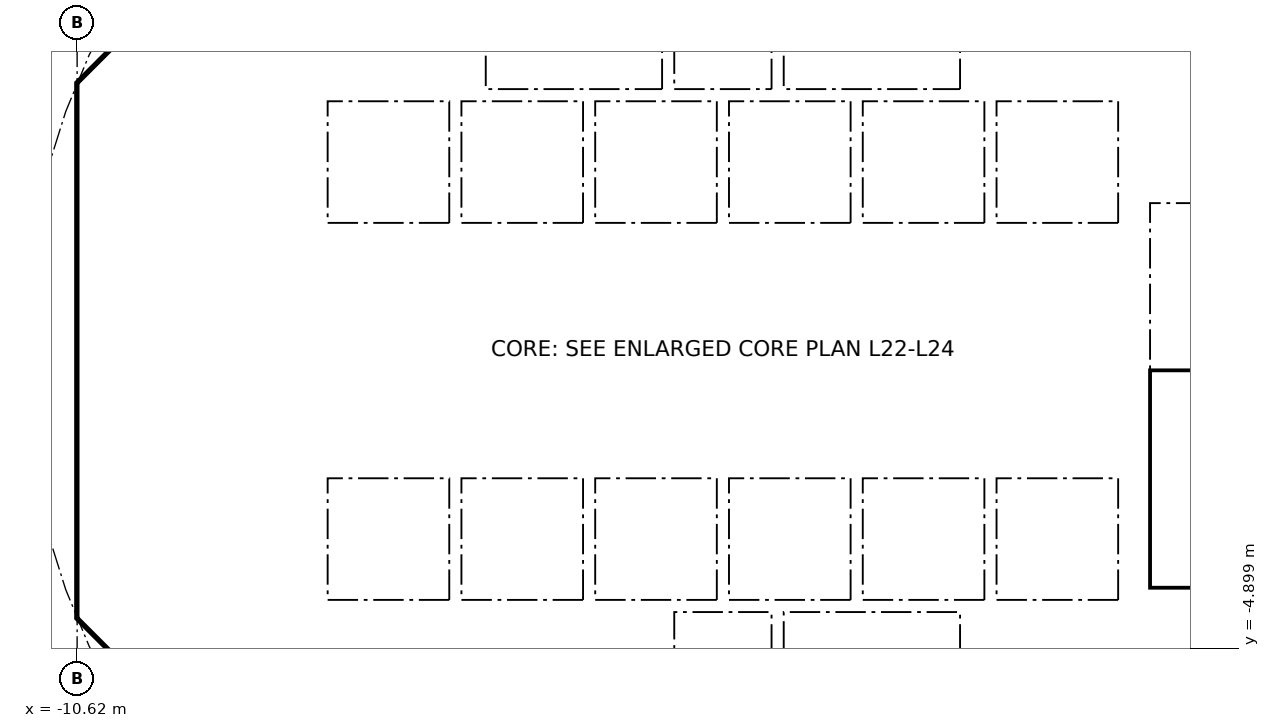
"""IFC4 building model, lengths in metres.
Left out: names, types, materials, properties, quantities, classifications, styles, units other than length and angle.
Written with IfcOpenShell. Run it as: python <this file> out.ifc"""

import sys

from ifc_helpers import new_model, si_unit, direction, frame, frame_2d, origin, place, context, subcontext, project, spatial, polyline, rectangle, outline, extrude, element, fill, save


model = new_model("IFC4")
c1 = context("Model", 3, precision=1e-05, world=origin(), true_north=direction((0.0, 1.0)))
c2 = subcontext(c1, "Body", "Model", "MODEL_VIEW")
j1 = project(units=[si_unit("LENGTHUNIT", "METRE"), si_unit("PLANEANGLEUNIT", "RADIAN")], contexts=[c1])
p1 = place(None, origin())
s1 = spatial("IfcSite", under=j1, at=p1, CompositionType="ELEMENT")
p2 = place(p1, origin())
s2 = spatial("IfcBuilding", under=s1, at=p2, CompositionType="ELEMENT")
p3 = place(p2, frame((0.0, 0.0, 99.2)))
s3 = spatial("IfcBuildingStorey", under=s2, at=p3, CompositionType="ELEMENT", Elevation=99.2)
p4 = place(p3, frame((9.988, 4.613, 0.0), z_axis=(0.0, 0.0, 1.0), x_axis=(-0.707106781187, 0.707106781187, 0.0)))
e1 = element("IfcWall", 1, at=p4, inside=s3, PredefinedType="SHEAR", context=c2, shape_type="SweptSolid", body=[
    extrude(rectangle(XDim=7.602, YDim=0.6, at=frame_2d((3.801, 0.0))), origin(), (0.0, 0.0, 1.0), 3.44),
])
p5 = place(p4, frame((3.201, 0.0, 0.0)))
e2 = element("IfcOpeningElement", 2, at=p5, cuts=e1, PredefinedType="OPENING", context=c2, shape_type="SweptSolid", body=[
    extrude(rectangle(XDim=1.2, YDim=2.1, at=frame_2d((0.6, 1.05))), frame((0.0, 0.31, 0.0), z_axis=(0.0, -1.0, 0.0), x_axis=(1.0, 0.0, 0.0)), (0.0, 0.0, 1.0), 0.62),
])
p6 = place(p3, frame((-4.613, 9.988, 0.0), z_axis=(0.0, 0.0, 1.0), x_axis=(-0.707106781187, -0.707106781187, 0.0)))
e3 = element("IfcWall", 3, at=p6, inside=s3, PredefinedType="SHEAR", context=c2, shape_type="SweptSolid", body=[
    extrude(rectangle(XDim=7.602, YDim=0.6, at=frame_2d((3.801, 0.0))), origin(), (0.0, 0.0, 1.0), 3.44),
])
p7 = place(p6, frame((0.351, 0.0, 0.0)))
e4 = element("IfcOpeningElement", 4, at=p7, cuts=e3, PredefinedType="OPENING", context=c2, shape_type="SweptSolid", body=[
    extrude(rectangle(XDim=1.1, YDim=2.1, at=frame_2d((0.55, 1.05))), frame((0.0, 0.31, 0.0), z_axis=(0.0, -1.0, 0.0), x_axis=(1.0, 0.0, 0.0)), (0.0, 0.0, 1.0), 0.62),
])
p8 = place(p3, frame((-10.325, 3.801, 0.0), z_axis=(0.0, 0.0, 1.0), x_axis=(0.0, -1.0, 0.0)))
e5 = element("IfcWall", 5, at=p8, inside=s3, PredefinedType="SHEAR", context=c2, shape_type="SweptSolid", body=[
    extrude(rectangle(XDim=7.602, YDim=0.6, at=frame_2d((3.801, 0.0))), origin(), (0.0, 0.0, 1.0), 3.44),
])
p9 = place(p8, frame((0.651, 0.0, 0.0)))
e6 = element("IfcOpeningElement", 6, at=p9, cuts=e5, PredefinedType="OPENING", context=c2, shape_type="SweptSolid", body=[
    extrude(rectangle(XDim=1.5, YDim=2.1, at=frame_2d((0.75, 1.05))), frame((0.0, 0.31, 0.0), z_axis=(0.0, -1.0, 0.0), x_axis=(1.0, 0.0, 0.0)), (0.0, 0.0, 1.0), 0.62),
])
p10 = place(p8, frame((5.451, 0.0, 0.0)))
e7 = element("IfcOpeningElement", 7, at=p10, cuts=e5, PredefinedType="OPENING", context=c2, shape_type="SweptSolid", body=[
    extrude(rectangle(XDim=1.5, YDim=2.1, at=frame_2d((0.75, 1.05))), frame((0.0, 0.31, 0.0), z_axis=(0.0, -1.0, 0.0), x_axis=(1.0, 0.0, 0.0)), (0.0, 0.0, 1.0), 0.62),
])
p11 = place(p3, frame((-9.988, -4.613, 0.0), z_axis=(0.0, 0.0, 1.0), x_axis=(0.707106781187, -0.707106781187, 0.0)))
e8 = element("IfcWall", 8, at=p11, inside=s3, PredefinedType="SHEAR", context=c2, shape_type="SweptSolid", body=[
    extrude(rectangle(XDim=7.602, YDim=0.6, at=frame_2d((3.801, 0.0))), origin(), (0.0, 0.0, 1.0), 3.44),
])
p12 = place(p11, frame((6.151, 0.0, 0.0)))
e9 = element("IfcOpeningElement", 9, at=p12, cuts=e8, PredefinedType="OPENING", context=c2, shape_type="SweptSolid", body=[
    extrude(rectangle(XDim=1.1, YDim=2.1, at=frame_2d((0.55, 1.05))), frame((0.0, 0.31, 0.0), z_axis=(0.0, -1.0, 0.0), x_axis=(1.0, 0.0, 0.0)), (0.0, 0.0, 1.0), 0.62),
])
p13 = place(p3, frame((4.613, -9.988, 0.0), z_axis=(0.0, 0.0, 1.0), x_axis=(0.707106781187, 0.707106781187, 0.0)))
e10 = element("IfcWall", 10, at=p13, inside=s3, PredefinedType="SHEAR", context=c2, shape_type="SweptSolid", body=[
    extrude(rectangle(XDim=7.602, YDim=0.6, at=frame_2d((3.801, 0.0))), origin(), (0.0, 0.0, 1.0), 3.44),
])
p14 = place(p13, frame((3.201, 0.0, 0.0)))
e11 = element("IfcOpeningElement", 11, at=p14, cuts=e10, PredefinedType="OPENING", context=c2, shape_type="SweptSolid", body=[
    extrude(rectangle(XDim=1.2, YDim=2.1, at=frame_2d((0.6, 1.05))), frame((0.0, 0.31, 0.0), z_axis=(0.0, -1.0, 0.0), x_axis=(1.0, 0.0, 0.0)), (0.0, 0.0, 1.0), 0.62),
])
p15 = place(p3, frame((-7.0, 4.1, 0.0), z_axis=(0.0, 0.0, 1.0), x_axis=(0.0, 1.0, 0.0)))
e12 = element("IfcWall", 12, at=p15, inside=s3, PredefinedType="PARTITIONING", context=c2, shape_type="SweptSolid", body=[
    extrude(rectangle(XDim=2.927, YDim=0.15, at=frame_2d((1.463, 0.0))), origin(), (0.0, 0.0, 1.0), 3.44),
])
p16 = place(p15, frame((1.051, 0.0, 0.0)))
e13 = element("IfcOpeningElement", 13, at=p16, cuts=e12, PredefinedType="OPENING", context=c2, shape_type="SweptSolid", body=[
    extrude(rectangle(XDim=0.9, YDim=2.1, at=frame_2d((0.45, 1.05))), frame((0.0, 0.085, 0.0), z_axis=(0.0, -1.0, 0.0), x_axis=(1.0, 0.0, 0.0)), (0.0, 0.0, 1.0), 0.17),
])
p17 = place(p3, frame((4.0, 4.3, 0.0), z_axis=(0.0, 0.0, 1.0), x_axis=(0.0, 1.0, 0.0)))
e14 = element("IfcWall", 14, at=p17, inside=s3, PredefinedType="SOLIDWALL", context=c2, shape_type="SweptSolid", body=[
    extrude(rectangle(XDim=2.2, YDim=0.2, at=frame_2d((1.1, 0.0))), origin(), (0.0, 0.0, 1.0), 3.44),
])
p18 = place(p17, frame((0.55, 0.0, 0.0)))
e15 = element("IfcOpeningElement", 15, at=p18, cuts=e14, PredefinedType="OPENING", context=c2, shape_type="SweptSolid", body=[
    extrude(rectangle(XDim=1.1, YDim=2.1, at=frame_2d((0.55, 1.05))), frame((0.0, 0.11, 0.0), z_axis=(0.0, -1.0, 0.0), x_axis=(1.0, 0.0, 0.0)), (0.0, 0.0, 1.0), 0.22),
])
p19 = place(p3, frame((-4.0, 4.3, 0.0), z_axis=(0.0, 0.0, 1.0), x_axis=(0.0, 1.0, 0.0)))
e16 = element("IfcWall", 16, at=p19, inside=s3, PredefinedType="SOLIDWALL", context=c2, shape_type="SweptSolid", body=[
    extrude(rectangle(XDim=2.2, YDim=0.2, at=frame_2d((1.1, 0.0))), origin(), (0.0, 0.0, 1.0), 3.44),
])
p20 = place(p19, frame((0.55, 0.0, 0.0)))
e17 = element("IfcOpeningElement", 17, at=p20, cuts=e16, PredefinedType="OPENING", context=c2, shape_type="SweptSolid", body=[
    extrude(rectangle(XDim=1.1, YDim=2.1, at=frame_2d((0.55, 1.05))), frame((0.0, 0.11, 0.0), z_axis=(0.0, -1.0, 0.0), x_axis=(1.0, 0.0, 0.0)), (0.0, 0.0, 1.0), 0.22),
])
p21 = place(p3, frame((-6.7, 2.0, 0.0), z_axis=(0.0, 0.0, 1.0), x_axis=(1.0, 0.0, 0.0)))
e18 = element("IfcWall", 18, at=p21, inside=s3, PredefinedType="SOLIDWALL", context=c2, shape_type="SweptSolid", body=[
    extrude(rectangle(XDim=13.4, YDim=0.2, at=frame_2d((6.7, 0.0))), origin(), (0.0, 0.0, 1.0), 3.44),
])
p22 = place(p21, frame((0.65, 0.0, 0.0)))
e19 = element("IfcOpeningElement", 19, at=p22, cuts=e18, PredefinedType="OPENING", context=c2, shape_type="SweptSolid", body=[
    extrude(rectangle(XDim=1.1, YDim=2.1, at=frame_2d((0.55, 1.05))), frame((0.0, 0.11, 0.0), z_axis=(0.0, -1.0, 0.0), x_axis=(1.0, 0.0, 0.0)), (0.0, 0.0, 1.0), 0.22),
])
p23 = place(p21, frame((2.85, 0.0, 0.0)))
e20 = element("IfcOpeningElement", 20, at=p23, cuts=e18, PredefinedType="OPENING", context=c2, shape_type="SweptSolid", body=[
    extrude(rectangle(XDim=1.1, YDim=2.1, at=frame_2d((0.55, 1.05))), frame((0.0, 0.11, 0.0), z_axis=(0.0, -1.0, 0.0), x_axis=(1.0, 0.0, 0.0)), (0.0, 0.0, 1.0), 0.22),
])
p24 = place(p21, frame((5.05, 0.0, 0.0)))
e21 = element("IfcOpeningElement", 21, at=p24, cuts=e18, PredefinedType="OPENING", context=c2, shape_type="SweptSolid", body=[
    extrude(rectangle(XDim=1.1, YDim=2.1, at=frame_2d((0.55, 1.05))), frame((0.0, 0.11, 0.0), z_axis=(0.0, -1.0, 0.0), x_axis=(1.0, 0.0, 0.0)), (0.0, 0.0, 1.0), 0.22),
])
p25 = place(p3, frame((6.7, 4.0, 0.0), z_axis=(0.0, 0.0, 1.0), x_axis=(1.0, 0.0, 0.0)))
e22 = element("IfcWall", 22, at=p25, inside=s3, PredefinedType="SOLIDWALL", context=c2, shape_type="SweptSolid", body=[
    extrude(rectangle(XDim=3.325, YDim=0.2, at=frame_2d((1.662, 0.0))), origin(), (0.0, 0.0, 1.0), 3.44),
])
p26 = place(p25, frame((1.25, 0.0, 0.0)))
e23 = element("IfcOpeningElement", 23, at=p26, cuts=e22, PredefinedType="OPENING", context=c2, shape_type="SweptSolid", body=[
    extrude(rectangle(XDim=1.1, YDim=2.1, at=frame_2d((0.55, 1.05))), frame((0.0, 0.11, 0.0), z_axis=(0.0, -1.0, 0.0), x_axis=(1.0, 0.0, 0.0)), (0.0, 0.0, 1.0), 0.22),
])
p27 = place(p3, frame((-7.4, -6.627, 0.0), z_axis=(0.0, 0.0, 1.0), x_axis=(0.0, 1.0, 0.0)))
e24 = element("IfcWall", 24, at=p27, inside=s3, PredefinedType="PARTITIONING", context=c2, shape_type="SweptSolid", body=[
    extrude(rectangle(XDim=2.527, YDim=0.15, at=frame_2d((1.263, 0.0))), origin(), (0.0, 0.0, 1.0), 3.44),
])
p28 = place(p27, frame((0.776, 0.0, 0.0)))
e25 = element("IfcOpeningElement", 25, at=p28, cuts=e24, PredefinedType="OPENING", context=c2, shape_type="SweptSolid", body=[
    extrude(rectangle(XDim=0.9, YDim=2.1, at=frame_2d((0.45, 1.05))), frame((0.0, 0.085, 0.0), z_axis=(0.0, -1.0, 0.0), x_axis=(1.0, 0.0, 0.0)), (0.0, 0.0, 1.0), 0.17),
])
p29 = place(p3, frame((4.0, -6.5, 0.0), z_axis=(0.0, 0.0, 1.0), x_axis=(0.0, 1.0, 0.0)))
e26 = element("IfcWall", 26, at=p29, inside=s3, PredefinedType="SOLIDWALL", context=c2, shape_type="SweptSolid", body=[
    extrude(rectangle(XDim=2.2, YDim=0.2, at=frame_2d((1.1, 0.0))), origin(), (0.0, 0.0, 1.0), 3.44),
])
p30 = place(p29, frame((0.55, 0.0, 0.0)))
e27 = element("IfcOpeningElement", 27, at=p30, cuts=e26, PredefinedType="OPENING", context=c2, shape_type="SweptSolid", body=[
    extrude(rectangle(XDim=1.1, YDim=2.1, at=frame_2d((0.55, 1.05))), frame((0.0, 0.11, 0.0), z_axis=(0.0, -1.0, 0.0), x_axis=(1.0, 0.0, 0.0)), (0.0, 0.0, 1.0), 0.22),
])
p31 = place(p3, frame((-4.0, -6.5, 0.0), z_axis=(0.0, 0.0, 1.0), x_axis=(0.0, 1.0, 0.0)))
e28 = element("IfcWall", 28, at=p31, inside=s3, PredefinedType="SOLIDWALL", context=c2, shape_type="SweptSolid", body=[
    extrude(rectangle(XDim=2.2, YDim=0.2, at=frame_2d((1.1, 0.0))), origin(), (0.0, 0.0, 1.0), 3.44),
])
p32 = place(p31, frame((0.65, 0.0, 0.0)))
e29 = element("IfcOpeningElement", 29, at=p32, cuts=e28, PredefinedType="OPENING", context=c2, shape_type="SweptSolid", body=[
    extrude(rectangle(XDim=0.9, YDim=2.1, at=frame_2d((0.45, 1.05))), frame((0.0, 0.11, 0.0), z_axis=(0.0, -1.0, 0.0), x_axis=(1.0, 0.0, 0.0)), (0.0, 0.0, 1.0), 0.22),
])
p33 = place(p3, frame((-6.7, -2.0, 0.0), z_axis=(0.0, 0.0, 1.0), x_axis=(1.0, 0.0, 0.0)))
e30 = element("IfcWall", 30, at=p33, inside=s3, PredefinedType="SOLIDWALL", context=c2, shape_type="SweptSolid", body=[
    extrude(rectangle(XDim=13.4, YDim=0.2, at=frame_2d((6.7, 0.0))), origin(), (0.0, 0.0, 1.0), 3.44),
])
p34 = place(p33, frame((0.65, 0.0, 0.0)))
e31 = element("IfcOpeningElement", 31, at=p34, cuts=e30, PredefinedType="OPENING", context=c2, shape_type="SweptSolid", body=[
    extrude(rectangle(XDim=1.1, YDim=2.1, at=frame_2d((0.55, 1.05))), frame((0.0, 0.11, 0.0), z_axis=(0.0, -1.0, 0.0), x_axis=(1.0, 0.0, 0.0)), (0.0, 0.0, 1.0), 0.22),
])
p35 = place(p33, frame((2.85, 0.0, 0.0)))
e32 = element("IfcOpeningElement", 32, at=p35, cuts=e30, PredefinedType="OPENING", context=c2, shape_type="SweptSolid", body=[
    extrude(rectangle(XDim=1.1, YDim=2.1, at=frame_2d((0.55, 1.05))), frame((0.0, 0.11, 0.0), z_axis=(0.0, -1.0, 0.0), x_axis=(1.0, 0.0, 0.0)), (0.0, 0.0, 1.0), 0.22),
])
p36 = place(p3, origin())
e33 = element("IfcWall", 33, at=p36, inside=s3, PredefinedType="SHEAR", context=c2, shape_type="SweptSolid", body=[
    extrude(outline(polyline([(-10.625, -3.801), (-10.025, -3.801), (-10.025, -4.152), (-9.776, -4.401), (-10.2, -4.825), (-10.625, -4.401), (-10.625, -3.801)])), origin(), (0.0, 0.0, 1.0), 3.44),
])
p37 = place(p3, origin())
e34 = element("IfcWall", 34, at=p37, inside=s3, PredefinedType="SHEAR", context=c2, shape_type="SweptSolid", body=[
    extrude(outline(polyline([(-10.2, 4.825), (-9.776, 4.401), (-10.025, 4.152), (-10.025, 3.801), (-10.625, 3.801), (-10.625, 4.401), (-10.2, 4.825)])), origin(), (0.0, 0.0, 1.0), 3.44),
])
for number, where, z_axis, x_axis in (
    (35, (-0.9, -6.5, 0.0), (0.0, 0.0, 1.0), (0.0, 1.0, 0.0)),
    (36, (0.9, -6.5, 0.0), (0.0, 0.0, 1.0), (0.0, 1.0, 0.0)),
):
    element("IfcWall", number, at=place(p3, frame(where, z_axis=z_axis, x_axis=x_axis)), inside=s3, PredefinedType="SOLIDWALL", context=c2, shape_type="SweptSolid", body=[
        extrude(rectangle(XDim=2.2, YDim=0.2, at=frame_2d((1.1, 0.0))), origin(), (0.0, 0.0, 1.0), 3.44),
    ])
p38 = place(p3, origin())
e37 = element("IfcWall", 37, at=p38, inside=s3, PredefinedType="SOLIDWALL", context=c2, shape_type="SweptSolid", body=[
    extrude(outline(polyline([(-6.7, -2.1), (-6.5, -2.1), (-6.5, -4.1), (-4.5, -4.1), (-4.5, -2.1), (-4.3, -2.1), (-4.3, -4.1), (-2.3, -4.1), (-2.3, -2.1), (-2.1, -2.1), (-2.1, -4.1), (-0.1, -4.1), (-0.1, -2.1), (0.1, -2.1), (0.1, -4.1), (2.1, -4.1), (2.1, -2.1), (2.3, -2.1), (2.3, -4.1), (4.3, -4.1), (4.3, -2.1), (4.5, -2.1), (4.5, -4.1), (6.5, -4.1), (6.5, -2.1), (6.7, -2.1), (6.7, -4.3), (-6.7, -4.3), (-6.7, -2.1)])), origin(), (0.0, 0.0, 1.0), 3.44),
])
for number, where, z_axis, x_axis in (
    (38, (-0.9, 4.3, 0.0), (0.0, 0.0, 1.0), (0.0, 1.0, 0.0)),
    (39, (0.9, 4.3, 0.0), (0.0, 0.0, 1.0), (0.0, 1.0, 0.0)),
):
    element("IfcWall", number, at=place(p3, frame(where, z_axis=z_axis, x_axis=x_axis)), inside=s3, PredefinedType="SOLIDWALL", context=c2, shape_type="SweptSolid", body=[
        extrude(rectangle(XDim=2.2, YDim=0.2, at=frame_2d((1.1, 0.0))), origin(), (0.0, 0.0, 1.0), 3.44),
    ])
p39 = place(p3, origin())
e40 = element("IfcWall", 40, at=p39, inside=s3, PredefinedType="SOLIDWALL", context=c2, shape_type="SweptSolid", body=[
    extrude(outline(polyline([(-6.5, 2.1), (-6.7, 2.1), (-6.7, 4.3), (6.7, 4.3), (6.7, 2.1), (6.5, 2.1), (6.5, 4.1), (4.5, 4.1), (4.5, 2.1), (4.3, 2.1), (4.3, 4.1), (2.3, 4.1), (2.3, 2.1), (2.1, 2.1), (2.1, 4.1), (0.1, 4.1), (0.1, 2.1), (-0.1, 2.1), (-0.1, 4.1), (-2.1, 4.1), (-2.1, 2.1), (-2.3, 2.1), (-2.3, 4.1), (-4.3, 4.1), (-4.3, 2.1), (-4.5, 2.1), (-4.5, 4.1), (-6.5, 4.1), (-6.5, 2.1)])), origin(), (0.0, 0.0, 1.0), 3.44),
])
for number, where, z_axis, x_axis in (
    (41, (-10.025, -4.0, 0.0), (0.0, 0.0, 1.0), (1.0, 0.0, 0.0)),
    (42, (-10.025, 4.0, 0.0), (0.0, 0.0, 1.0), (1.0, 0.0, 0.0)),
):
    element("IfcWall", number, at=place(p3, frame(where, z_axis=z_axis, x_axis=x_axis)), inside=s3, PredefinedType="PARTITIONING", context=c2, shape_type="SweptSolid", body=[
        extrude(rectangle(XDim=3.325, YDim=0.2, at=frame_2d((1.662, 0.0))), origin(), (0.0, 0.0, 1.0), 3.44),
    ])
p40 = place(p3, origin())
e43 = element("IfcWall", 43, at=p40, inside=s3, PredefinedType="SOLIDWALL", context=c2, shape_type="SweptSolid", body=[
    extrude(outline(polyline([(7.025, -3.9), (6.7, -3.9), (6.7, 3.9), (7.025, 3.9), (7.025, -3.9)])), origin(), (0.0, 0.0, 1.0), 3.44),
])
p41 = place(p3, origin())
e44 = element("IfcWall", 44, at=p41, inside=s3, PredefinedType="SOLIDWALL", context=c2, shape_type="SweptSolid", body=[
    extrude(outline(polyline([(10.025, -4.1), (6.7, -4.1), (6.7, -3.9), (10.025, -3.9), (10.025, -4.1)])), origin(), (0.0, 0.0, 1.0), 3.44),
])
p42 = place(p22, origin())
e45 = element("IfcDoor", 45, at=p42, inside=s3, OperationType="DOUBLE_DOOR_SLIDING", PredefinedType="DOOR", context=c2, shape_type="SweptSolid", body=[
    extrude(rectangle(XDim=1.1, YDim=2.1, at=frame_2d((0.55, 1.05))), frame((0.0, 0.025, 0.0), z_axis=(0.0, -1.0, 0.0), x_axis=(1.0, 0.0, 0.0)), (0.0, 0.0, 1.0), 0.05),
])
fill(e19, e45)
p43 = place(p23, origin())
e46 = element("IfcDoor", 46, at=p43, inside=s3, OperationType="DOUBLE_DOOR_SLIDING", PredefinedType="DOOR", context=c2, shape_type="SweptSolid", body=[
    extrude(rectangle(XDim=1.1, YDim=2.1, at=frame_2d((0.55, 1.05))), frame((0.0, 0.025, 0.0), z_axis=(0.0, -1.0, 0.0), x_axis=(1.0, 0.0, 0.0)), (0.0, 0.0, 1.0), 0.05),
])
fill(e20, e46)
p44 = place(p24, origin())
e47 = element("IfcDoor", 47, at=p44, inside=s3, OperationType="DOUBLE_DOOR_SLIDING", PredefinedType="DOOR", context=c2, shape_type="SweptSolid", body=[
    extrude(rectangle(XDim=1.1, YDim=2.1, at=frame_2d((0.55, 1.05))), frame((0.0, 0.025, 0.0), z_axis=(0.0, -1.0, 0.0), x_axis=(1.0, 0.0, 0.0)), (0.0, 0.0, 1.0), 0.05),
])
fill(e21, e47)
p45 = place(p34, origin())
e48 = element("IfcDoor", 48, at=p45, inside=s3, OperationType="DOUBLE_DOOR_SLIDING", PredefinedType="DOOR", context=c2, shape_type="SweptSolid", body=[
    extrude(rectangle(XDim=1.1, YDim=2.1, at=frame_2d((0.55, 1.05))), frame((0.0, 0.025, 0.0), z_axis=(0.0, -1.0, 0.0), x_axis=(1.0, 0.0, 0.0)), (0.0, 0.0, 1.0), 0.05),
])
fill(e31, e48)
p46 = place(p35, origin())
e49 = element("IfcDoor", 49, at=p46, inside=s3, OperationType="DOUBLE_DOOR_SLIDING", PredefinedType="DOOR", context=c2, shape_type="SweptSolid", body=[
    extrude(rectangle(XDim=1.1, YDim=2.1, at=frame_2d((0.55, 1.05))), frame((0.0, 0.025, 0.0), z_axis=(0.0, -1.0, 0.0), x_axis=(1.0, 0.0, 0.0)), (0.0, 0.0, 1.0), 0.05),
])
fill(e32, e49)
p47 = place(p18, origin())
e50 = element("IfcDoor", 50, at=p47, inside=s3, OperationType="DOUBLE_DOOR_SLIDING", PredefinedType="DOOR", context=c2, shape_type="SweptSolid", body=[
    extrude(rectangle(XDim=1.1, YDim=2.1, at=frame_2d((0.55, 1.05))), frame((0.0, 0.025, 0.0), z_axis=(0.0, -1.0, 0.0), x_axis=(1.0, 0.0, 0.0)), (0.0, 0.0, 1.0), 0.05),
])
fill(e15, e50)
p48 = place(p30, origin())
e51 = element("IfcDoor", 51, at=p48, inside=s3, OperationType="DOUBLE_DOOR_SLIDING", PredefinedType="DOOR", context=c2, shape_type="SweptSolid", body=[
    extrude(rectangle(XDim=1.1, YDim=2.1, at=frame_2d((0.55, 1.05))), frame((0.0, 0.025, 0.0), z_axis=(0.0, -1.0, 0.0), x_axis=(1.0, 0.0, 0.0)), (0.0, 0.0, 1.0), 0.05),
])
fill(e27, e51)
p49 = place(p20, origin())
e52 = element("IfcDoor", 52, at=p49, inside=s3, OperationType="DOUBLE_DOOR_SLIDING", PredefinedType="DOOR", context=c2, shape_type="SweptSolid", body=[
    extrude(rectangle(XDim=1.1, YDim=2.1, at=frame_2d((0.55, 1.05))), frame((0.0, 0.025, 0.0), z_axis=(0.0, -1.0, 0.0), x_axis=(1.0, 0.0, 0.0)), (0.0, 0.0, 1.0), 0.05),
])
fill(e17, e52)
p50 = place(p9, origin())
e53 = element("IfcDoor", 53, at=p50, inside=s3, OperationType="DOUBLE_DOOR_SINGLE_SWING", PredefinedType="DOOR", context=c2, shape_type="SweptSolid", body=[
    extrude(rectangle(XDim=1.5, YDim=2.1, at=frame_2d((0.75, 1.05))), frame((0.0, 0.025, 0.0), z_axis=(0.0, -1.0, 0.0), x_axis=(1.0, 0.0, 0.0)), (0.0, 0.0, 1.0), 0.05),
])
fill(e6, e53)
p51 = place(p10, origin())
e54 = element("IfcDoor", 54, at=p51, inside=s3, OperationType="DOUBLE_DOOR_SINGLE_SWING", PredefinedType="DOOR", context=c2, shape_type="SweptSolid", body=[
    extrude(rectangle(XDim=1.5, YDim=2.1, at=frame_2d((0.75, 1.05))), frame((0.0, 0.025, 0.0), z_axis=(0.0, -1.0, 0.0), x_axis=(1.0, 0.0, 0.0)), (0.0, 0.0, 1.0), 0.05),
])
fill(e7, e54)
save(model, sys.argv[1])
